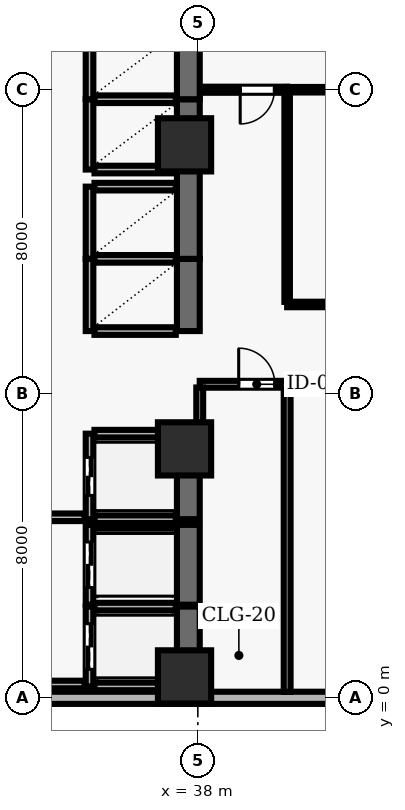
"""IFC4 building model, lengths in metres.
Left out: names, types, materials, properties, quantities, classifications, styles, units other than length and angle.
Written with IfcOpenShell. Run it as: python <this file> out.ifc"""

import sys

from ifc_helpers import new_model, si_unit, direction, frame, frame_2d, origin, origin_2d, place, context, subcontext, project, spatial, rectangle, extrude, element, fill, save


model = new_model("IFC4")
c1 = context("Model", 3, precision=1e-05, world=origin(), true_north=direction((0.0, 1.0)))
c2 = subcontext(c1, "Body", "Model", "MODEL_VIEW")
j1 = project(units=[si_unit("LENGTHUNIT", "METRE"), si_unit("PLANEANGLEUNIT", "RADIAN")], contexts=[c1])
p1 = place(None, origin())
s1 = spatial("IfcSite", under=j1, at=p1, CompositionType="ELEMENT")
p2 = place(p1, origin())
s2 = spatial("IfcBuilding", under=s1, at=p2, CompositionType="ELEMENT")
p3 = place(p2, frame((0.0, 0.0, 42.7)))
s3 = spatial("IfcBuildingStorey", under=s2, at=p3, CompositionType="ELEMENT", Elevation=42.7)
for number, where, z_axis, x_axis in (
    (1, (37.65, 0.55, 0.0), (0.0, 0.0, 1.0), (1.0, 0.0, 0.0)),
    (2, (37.65, 6.55, 0.0), (0.0, 0.0, 1.0), (1.0, 0.0, 0.0)),
    (3, (37.65, 14.55, 0.0), (0.0, 0.0, 1.0), (1.0, 0.0, 0.0)),
):
    element("IfcColumn", number, at=place(p3, frame(where, z_axis=z_axis, x_axis=x_axis)), inside=s3, PredefinedType="COLUMN", context=c2, shape_type="SweptSolid", body=[
        extrude(rectangle(XDim=1.4, YDim=1.4, at=origin_2d()), origin(), (0.0, 0.0, 1.0), 3.9),
    ])
p4 = place(p3, frame((24.5, 0.0, 0.0), z_axis=(0.0, 0.0, 1.0), x_axis=(1.0, 0.0, 0.0)))
e4 = element("IfcWall", 4, at=p4, inside=s3, PredefinedType="SOLIDWALL", context=c2, shape_type="SweptSolid", body=[
    extrude(rectangle(XDim=49.0, YDim=0.32, at=frame_2d((24.5, 0.0))), origin(), (0.0, 0.0, 1.0), 3.69),
])
p5 = place(p4, frame((1.822, 0.0, 0.9)))
e5 = element("IfcOpeningElement", 5, at=p5, cuts=e4, PredefinedType="OPENING", context=c2, shape_type="SweptSolid", body=[
    extrude(rectangle(XDim=1.8, YDim=2.2, at=frame_2d((0.9, 1.1))), frame((0.0, 0.17, 0.0), z_axis=(0.0, -1.0, 0.0), x_axis=(1.0, 0.0, 0.0)), (0.0, 0.0, 1.0), 0.34),
])
p6 = place(p4, frame((18.156, 0.0, 0.9)))
e6 = element("IfcOpeningElement", 6, at=p6, cuts=e4, PredefinedType="OPENING", context=c2, shape_type="SweptSolid", body=[
    extrude(rectangle(XDim=1.8, YDim=2.2, at=frame_2d((0.9, 1.1))), frame((0.0, 0.17, 0.0), z_axis=(0.0, -1.0, 0.0), x_axis=(1.0, 0.0, 0.0)), (0.0, 0.0, 1.0), 0.34),
])
p7 = place(p4, frame((23.6, 0.0, 0.9)))
e7 = element("IfcOpeningElement", 7, at=p7, cuts=e4, PredefinedType="OPENING", context=c2, shape_type="SweptSolid", body=[
    extrude(rectangle(XDim=1.8, YDim=2.2, at=frame_2d((0.9, 1.1))), frame((0.0, 0.17, 0.0), z_axis=(0.0, -1.0, 0.0), x_axis=(1.0, 0.0, 0.0)), (0.0, 0.0, 1.0), 0.34),
])
p8 = place(p4, frame((29.044, 0.0, 0.9)))
e8 = element("IfcOpeningElement", 8, at=p8, cuts=e4, PredefinedType="OPENING", context=c2, shape_type="SweptSolid", body=[
    extrude(rectangle(XDim=1.8, YDim=2.2, at=frame_2d((0.9, 1.1))), frame((0.0, 0.17, 0.0), z_axis=(0.0, -1.0, 0.0), x_axis=(1.0, 0.0, 0.0)), (0.0, 0.0, 1.0), 0.34),
])
p9 = place(p4, frame((34.489, 0.0, 0.9)))
e9 = element("IfcOpeningElement", 9, at=p9, cuts=e4, PredefinedType="OPENING", context=c2, shape_type="SweptSolid", body=[
    extrude(rectangle(XDim=1.8, YDim=2.2, at=frame_2d((0.9, 1.1))), frame((0.0, 0.17, 0.0), z_axis=(0.0, -1.0, 0.0), x_axis=(1.0, 0.0, 0.0)), (0.0, 0.0, 1.0), 0.34),
])
p10 = place(p4, frame((39.933, 0.0, 0.9)))
e10 = element("IfcOpeningElement", 10, at=p10, cuts=e4, PredefinedType="OPENING", context=c2, shape_type="SweptSolid", body=[
    extrude(rectangle(XDim=1.8, YDim=2.2, at=frame_2d((0.9, 1.1))), frame((0.0, 0.17, 0.0), z_axis=(0.0, -1.0, 0.0), x_axis=(1.0, 0.0, 0.0)), (0.0, 0.0, 1.0), 0.34),
])
p11 = place(p4, frame((45.378, 0.0, 0.9)))
e11 = element("IfcOpeningElement", 11, at=p11, cuts=e4, PredefinedType="OPENING", context=c2, shape_type="SweptSolid", body=[
    extrude(rectangle(XDim=1.8, YDim=2.2, at=frame_2d((0.9, 1.1))), frame((0.0, 0.17, 0.0), z_axis=(0.0, -1.0, 0.0), x_axis=(1.0, 0.0, 0.0)), (0.0, 0.0, 1.0), 0.34),
])
p12 = place(p3, frame((35.15, 2.4, 0.0), z_axis=(0.0, 0.0, 1.0), x_axis=(0.0, -1.0, 0.0)))
e12 = element("IfcWall", 12, at=p12, inside=s3, PredefinedType="SOLIDWALL", context=c2, shape_type="SweptSolid", body=[
    extrude(rectangle(XDim=2.1, YDim=0.2, at=frame_2d((1.05, 0.0))), origin(), (0.0, 0.0, 1.0), 3.69),
])
p13 = place(p12, frame((0.45, 0.0, 0.0)))
e13 = element("IfcOpeningElement", 13, at=p13, cuts=e12, PredefinedType="OPENING", context=c2, shape_type="SweptSolid", body=[
    extrude(rectangle(XDim=1.2, YDim=2.15, at=frame_2d((0.6, 1.075))), frame((0.0, 0.11, 0.0), z_axis=(0.0, -1.0, 0.0), x_axis=(1.0, 0.0, 0.0)), (0.0, 0.0, 1.0), 0.22),
])
p14 = place(p3, frame((37.75, 0.3, 0.0), z_axis=(0.0, 0.0, 1.0), x_axis=(0.0, 1.0, 0.0)))
e14 = element("IfcWall", 14, at=p14, inside=s3, PredefinedType="SHEAR", context=c2, shape_type="SweptSolid", body=[
    extrude(rectangle(XDim=2.1, YDim=0.6, at=frame_2d((1.05, 0.0))), origin(), (0.0, 0.0, 1.0), 3.69),
])
for number, where, z_axis, x_axis in (
    (15, (35.28, 0.3, 0.0), (0.0, 0.0, 1.0), (1.0, 0.0, 0.0)),
    (16, (37.42, 2.4, 0.0), (0.0, 0.0, 1.0), (-1.0, 0.0, 0.0)),
):
    element("IfcWall", number, at=place(p3, frame(where, z_axis=z_axis, x_axis=x_axis)), inside=s3, PredefinedType="SOLIDWALL", context=c2, shape_type="SweptSolid", body=[
        extrude(rectangle(XDim=2.14, YDim=0.2, at=frame_2d((1.07, 0.0))), origin(), (0.0, 0.0, 1.0), 3.69),
    ])
p15 = place(p3, frame((35.15, 4.55, 0.0), z_axis=(0.0, 0.0, 1.0), x_axis=(0.0, -1.0, 0.0)))
e17 = element("IfcWall", 17, at=p15, inside=s3, PredefinedType="SOLIDWALL", context=c2, shape_type="SweptSolid", body=[
    extrude(rectangle(XDim=2.1, YDim=0.2, at=frame_2d((1.05, 0.0))), origin(), (0.0, 0.0, 1.0), 3.69),
])
p16 = place(p15, frame((0.45, 0.0, 0.0)))
e18 = element("IfcOpeningElement", 18, at=p16, cuts=e17, PredefinedType="OPENING", context=c2, shape_type="SweptSolid", body=[
    extrude(rectangle(XDim=1.2, YDim=2.15, at=frame_2d((0.6, 1.075))), frame((0.0, 0.11, 0.0), z_axis=(0.0, -1.0, 0.0), x_axis=(1.0, 0.0, 0.0)), (0.0, 0.0, 1.0), 0.22),
])
p17 = place(p3, frame((37.75, 2.45, 0.0), z_axis=(0.0, 0.0, 1.0), x_axis=(0.0, 1.0, 0.0)))
e19 = element("IfcWall", 19, at=p17, inside=s3, PredefinedType="SHEAR", context=c2, shape_type="SweptSolid", body=[
    extrude(rectangle(XDim=2.1, YDim=0.6, at=frame_2d((1.05, 0.0))), origin(), (0.0, 0.0, 1.0), 3.69),
])
p18 = place(p3, frame((37.42, 4.55, 0.0), z_axis=(0.0, 0.0, 1.0), x_axis=(-1.0, 0.0, 0.0)))
e20 = element("IfcWall", 20, at=p18, inside=s3, PredefinedType="SOLIDWALL", context=c2, shape_type="SweptSolid", body=[
    extrude(rectangle(XDim=2.14, YDim=0.2, at=frame_2d((1.07, 0.0))), origin(), (0.0, 0.0, 1.0), 3.69),
])
p19 = place(p3, frame((35.15, 6.95, 0.0), z_axis=(0.0, 0.0, 1.0), x_axis=(0.0, -1.0, 0.0)))
e21 = element("IfcWall", 21, at=p19, inside=s3, PredefinedType="SOLIDWALL", context=c2, shape_type="SweptSolid", body=[
    extrude(rectangle(XDim=2.25, YDim=0.2, at=frame_2d((1.125, 0.0))), origin(), (0.0, 0.0, 1.0), 3.69),
])
p20 = place(p19, frame((0.625, 0.0, 0.0)))
e22 = element("IfcOpeningElement", 22, at=p20, cuts=e21, PredefinedType="OPENING", context=c2, shape_type="SweptSolid", body=[
    extrude(rectangle(XDim=1.0, YDim=2.1, at=frame_2d((0.5, 1.05))), frame((0.0, 0.11, 0.0), z_axis=(0.0, -1.0, 0.0), x_axis=(1.0, 0.0, 0.0)), (0.0, 0.0, 1.0), 0.22),
])
p21 = place(p3, frame((37.75, 4.7, 0.0), z_axis=(0.0, 0.0, 1.0), x_axis=(0.0, 1.0, 0.0)))
e23 = element("IfcWall", 23, at=p21, inside=s3, PredefinedType="SHEAR", context=c2, shape_type="SweptSolid", body=[
    extrude(rectangle(XDim=2.25, YDim=0.6, at=frame_2d((1.125, 0.0))), origin(), (0.0, 0.0, 1.0), 3.69),
])
for number, where, z_axis, x_axis in (
    (24, (35.28, 4.7, 0.0), (0.0, 0.0, 1.0), (1.0, 0.0, 0.0)),
    (25, (37.42, 6.95, 0.0), (0.0, 0.0, 1.0), (-1.0, 0.0, 0.0)),
):
    element("IfcWall", number, at=place(p3, frame(where, z_axis=z_axis, x_axis=x_axis)), inside=s3, PredefinedType="SOLIDWALL", context=c2, shape_type="SweptSolid", body=[
        extrude(rectangle(XDim=2.14, YDim=0.2, at=frame_2d((1.07, 0.0))), origin(), (0.0, 0.0, 1.0), 3.69),
    ])
p22 = place(p3, frame((35.15, 11.55, 0.0), z_axis=(0.0, 0.0, 1.0), x_axis=(0.0, -1.0, 0.0)))
e26 = element("IfcWall", 26, at=p22, inside=s3, PredefinedType="SOLIDWALL", context=c2, shape_type="SweptSolid", body=[
    extrude(rectangle(XDim=1.9, YDim=0.2, at=frame_2d((0.95, 0.0))), origin(), (0.0, 0.0, 1.0), 3.69),
])
p23 = place(p3, frame((37.75, 9.65, 0.0), z_axis=(0.0, 0.0, 1.0), x_axis=(0.0, 1.0, 0.0)))
e27 = element("IfcWall", 27, at=p23, inside=s3, PredefinedType="SHEAR", context=c2, shape_type="SweptSolid", body=[
    extrude(rectangle(XDim=1.9, YDim=0.6, at=frame_2d((0.95, 0.0))), origin(), (0.0, 0.0, 1.0), 3.69),
])
for number, where, z_axis, x_axis in (
    (28, (35.28, 9.65, 0.0), (0.0, 0.0, 1.0), (1.0, 0.0, 0.0)),
    (29, (37.42, 11.55, 0.0), (0.0, 0.0, 1.0), (-1.0, 0.0, 0.0)),
):
    element("IfcWall", number, at=place(p3, frame(where, z_axis=z_axis, x_axis=x_axis)), inside=s3, PredefinedType="SOLIDWALL", context=c2, shape_type="SweptSolid", body=[
        extrude(rectangle(XDim=2.14, YDim=0.2, at=frame_2d((1.07, 0.0))), origin(), (0.0, 0.0, 1.0), 3.69),
    ])
p24 = place(p3, frame((35.15, 13.45, 0.0), z_axis=(0.0, 0.0, 1.0), x_axis=(0.0, -1.0, 0.0)))
e30 = element("IfcWall", 30, at=p24, inside=s3, PredefinedType="SOLIDWALL", context=c2, shape_type="SweptSolid", body=[
    extrude(rectangle(XDim=1.9, YDim=0.2, at=frame_2d((0.95, 0.0))), origin(), (0.0, 0.0, 1.0), 3.69),
])
p25 = place(p3, frame((37.75, 11.55, 0.0), z_axis=(0.0, 0.0, 1.0), x_axis=(0.0, 1.0, 0.0)))
e31 = element("IfcWall", 31, at=p25, inside=s3, PredefinedType="SHEAR", context=c2, shape_type="SweptSolid", body=[
    extrude(rectangle(XDim=2.35, YDim=0.6, at=frame_2d((1.175, 0.0))), origin(), (0.0, 0.0, 1.0), 3.69),
])
p26 = place(p3, frame((37.42, 13.45, 0.0), z_axis=(0.0, 0.0, 1.0), x_axis=(-1.0, 0.0, 0.0)))
e32 = element("IfcWall", 32, at=p26, inside=s3, PredefinedType="SOLIDWALL", context=c2, shape_type="SweptSolid", body=[
    extrude(rectangle(XDim=2.14, YDim=0.2, at=frame_2d((1.07, 0.0))), origin(), (0.0, 0.0, 1.0), 3.69),
])
p27 = place(p3, frame((35.15, 15.75, 0.0), z_axis=(0.0, 0.0, 1.0), x_axis=(0.0, -1.0, 0.0)))
e33 = element("IfcWall", 33, at=p27, inside=s3, PredefinedType="SOLIDWALL", context=c2, shape_type="SweptSolid", body=[
    extrude(rectangle(XDim=1.85, YDim=0.2, at=frame_2d((0.925, 0.0))), origin(), (0.0, 0.0, 1.0), 3.69),
])
p28 = place(p3, frame((37.75, 13.9, 0.0), z_axis=(0.0, 0.0, 1.0), x_axis=(0.0, 1.0, 0.0)))
e34 = element("IfcWall", 34, at=p28, inside=s3, PredefinedType="SHEAR", context=c2, shape_type="SweptSolid", body=[
    extrude(rectangle(XDim=1.85, YDim=0.6, at=frame_2d((0.925, 0.0))), origin(), (0.0, 0.0, 1.0), 3.69),
])
for number, where, z_axis, x_axis in (
    (35, (35.28, 13.9, 0.0), (0.0, 0.0, 1.0), (1.0, 0.0, 0.0)),
    (36, (37.42, 15.75, 0.0), (0.0, 0.0, 1.0), (-1.0, 0.0, 0.0)),
):
    element("IfcWall", number, at=place(p3, frame(where, z_axis=z_axis, x_axis=x_axis)), inside=s3, PredefinedType="SOLIDWALL", context=c2, shape_type="SweptSolid", body=[
        extrude(rectangle(XDim=2.14, YDim=0.2, at=frame_2d((1.07, 0.0))), origin(), (0.0, 0.0, 1.0), 3.69),
    ])
p29 = place(p3, frame((35.15, 17.6, 0.0), z_axis=(0.0, 0.0, 1.0), x_axis=(0.0, -1.0, 0.0)))
e37 = element("IfcWall", 37, at=p29, inside=s3, PredefinedType="SOLIDWALL", context=c2, shape_type="SweptSolid", body=[
    extrude(rectangle(XDim=1.85, YDim=0.2, at=frame_2d((0.925, 0.0))), origin(), (0.0, 0.0, 1.0), 3.69),
])
p30 = place(p3, frame((37.75, 15.75, 0.0), z_axis=(0.0, 0.0, 1.0), x_axis=(0.0, 1.0, 0.0)))
e38 = element("IfcWall", 38, at=p30, inside=s3, PredefinedType="SHEAR", context=c2, shape_type="SweptSolid", body=[
    extrude(rectangle(XDim=1.85, YDim=0.6, at=frame_2d((0.925, 0.0))), origin(), (0.0, 0.0, 1.0), 3.69),
])
p31 = place(p3, frame((31.65, 0.35, 0.0), z_axis=(0.0, 0.0, 1.0), x_axis=(1.0, 0.0, 0.0)))
e39 = element("IfcWall", 39, at=p31, inside=s3, PredefinedType="SOLIDWALL", context=c2, shape_type="SweptSolid", body=[
    extrude(rectangle(XDim=3.37, YDim=0.2, at=frame_2d((1.685, 0.0))), origin(), (0.0, 0.0, 1.0), 3.69),
])
p32 = place(p3, frame((35.02, 4.75, 0.0), z_axis=(0.0, 0.0, 1.0), x_axis=(-1.0, 0.0, 0.0)))
e40 = element("IfcWall", 40, at=p32, inside=s3, PredefinedType="SOLIDWALL", context=c2, shape_type="SweptSolid", body=[
    extrude(rectangle(XDim=3.11, YDim=0.2, at=frame_2d((1.555, 0.0))), origin(), (0.0, 0.0, 1.0), 3.69),
])
p33 = place(p32, frame((1.03, 0.0, 0.0)))
e41 = element("IfcOpeningElement", 41, at=p33, cuts=e40, PredefinedType="OPENING", context=c2, shape_type="SweptSolid", body=[
    extrude(rectangle(XDim=1.05, YDim=2.15, at=frame_2d((0.525, 1.075))), frame((0.0, 0.11, 0.0), z_axis=(0.0, -1.0, 0.0), x_axis=(1.0, 0.0, 0.0)), (0.0, 0.0, 1.0), 0.22),
])
p34 = place(p3, frame((38.05, 8.25, 0.0), z_axis=(0.0, 0.0, 1.0), x_axis=(1.0, 0.0, 0.0)))
e42 = element("IfcWall", 42, at=p34, inside=s3, PredefinedType="PARTITIONING", context=c2, shape_type="SweptSolid", body=[
    extrude(rectangle(XDim=2.3, YDim=0.18, at=frame_2d((1.15, 0.0))), origin(), (0.0, 0.0, 1.0), 3.055),
])
p35 = place(p34, frame((1.025, 0.0, 0.0)))
e43 = element("IfcOpeningElement", 43, at=p35, cuts=e42, PredefinedType="OPENING", context=c2, shape_type="SweptSolid", body=[
    extrude(rectangle(XDim=0.95, YDim=2.1, at=frame_2d((0.475, 1.05))), frame((0.0, 0.1, 0.0), z_axis=(0.0, -1.0, 0.0), x_axis=(1.0, 0.0, 0.0)), (0.0, 0.0, 1.0), 0.2),
])
p36 = place(p3, frame((40.35, 8.25, 0.0), z_axis=(0.0, 0.0, 1.0), x_axis=(1.0, 0.0, 0.0)))
e44 = element("IfcWall", 44, at=p36, inside=s3, PredefinedType="PARTITIONING", context=c2, shape_type="SweptSolid", body=[
    extrude(rectangle(XDim=17.45, YDim=0.145, at=frame_2d((8.725, 0.0))), origin(), (0.0, 0.0, 1.0), 3.055),
])
p37 = place(p36, frame((8.175, 0.0, 0.0)))
e45 = element("IfcOpeningElement", 45, at=p37, cuts=e44, PredefinedType="OPENING", context=c2, shape_type="SweptSolid", body=[
    extrude(rectangle(XDim=1.1, YDim=2.15, at=frame_2d((0.55, 1.075))), frame((0.0, 0.083, 0.0), z_axis=(0.0, -1.0, 0.0), x_axis=(1.0, 0.0, 0.0)), (0.0, 0.0, 1.0), 0.165),
])
p38 = place(p3, frame((40.35, 16.0, 0.0), z_axis=(0.0, 0.0, 1.0), x_axis=(1.0, 0.0, 0.0)))
e46 = element("IfcWall", 46, at=p38, inside=s3, PredefinedType="PARTITIONING", context=c2, shape_type="SweptSolid", body=[
    extrude(rectangle(XDim=13.545, YDim=0.145, at=frame_2d((6.772, 0.0))), origin(), (0.0, 0.0, 1.0), 3.39),
])
p39 = place(p3, frame((40.35, 16.0, 0.0), z_axis=(0.0, 0.0, 1.0), x_axis=(-1.0, 0.0, 0.0)))
e47 = element("IfcWall", 47, at=p39, inside=s3, PredefinedType="PARTITIONING", context=c2, shape_type="SweptSolid", body=[
    extrude(rectangle(XDim=2.27, YDim=0.16, at=frame_2d((1.135, 0.0))), origin(), (0.0, 0.0, 1.0), 3.69),
])
p40 = place(p39, frame((0.335, 0.0, 0.0)))
e48 = element("IfcOpeningElement", 48, at=p40, cuts=e47, PredefinedType="OPENING", context=c2, shape_type="SweptSolid", body=[
    extrude(rectangle(XDim=0.9, YDim=2.1, at=frame_2d((0.45, 1.05))), frame((0.0, 0.09, 0.0), z_axis=(0.0, -1.0, 0.0), x_axis=(1.0, 0.0, 0.0)), (0.0, 0.0, 1.0), 0.18),
])
p41 = place(p3, frame((57.8, 10.35, 0.0), z_axis=(0.0, 0.0, 1.0), x_axis=(-1.0, 0.0, 0.0)))
e49 = element("IfcWall", 49, at=p41, inside=s3, PredefinedType="PARTITIONING", context=c2, shape_type="SweptSolid", body=[
    extrude(rectangle(XDim=17.45, YDim=0.145, at=frame_2d((8.725, 0.0))), origin(), (0.0, 0.0, 1.0), 3.277),
])
p42 = place(p41, frame((8.175, 0.0, 0.0)))
e50 = element("IfcOpeningElement", 50, at=p42, cuts=e49, PredefinedType="OPENING", context=c2, shape_type="SweptSolid", body=[
    extrude(rectangle(XDim=1.1, YDim=2.15, at=frame_2d((0.55, 1.075))), frame((0.0, 0.083, 0.0), z_axis=(0.0, -1.0, 0.0), x_axis=(1.0, 0.0, 0.0)), (0.0, 0.0, 1.0), 0.165),
])
p43 = place(p3, frame((38.05, 7.05, 0.0), z_axis=(0.0, 0.0, 1.0), x_axis=(0.0, 1.0, 0.0)))
e51 = element("IfcWall", 51, at=p43, inside=s3, PredefinedType="PARTITIONING", context=c2, shape_type="SweptSolid", body=[
    extrude(rectangle(XDim=1.115, YDim=0.18, at=frame_2d((0.558, 0.0))), origin(), (0.0, 0.0, 1.0), 3.055),
])
p44 = place(p3, frame((40.35, 0.155, 0.0), z_axis=(0.0, 0.0, 1.0), x_axis=(0.0, 1.0, 0.0)))
e52 = element("IfcWall", 52, at=p44, inside=s3, PredefinedType="PARTITIONING", context=c2, shape_type="SweptSolid", body=[
    extrude(rectangle(XDim=8.01, YDim=0.18, at=frame_2d((4.005, 0.0))), origin(), (0.0, 0.0, 1.0), 3.69),
])
p45 = place(p3, frame((40.35, 10.418, 0.0), z_axis=(0.0, 0.0, 1.0), x_axis=(0.0, 1.0, 0.0)))
e53 = element("IfcWall", 53, at=p45, inside=s3, PredefinedType="PARTITIONING", context=c2, shape_type="SweptSolid", body=[
    extrude(rectangle(XDim=5.507, YDim=0.145, at=frame_2d((2.753, 0.0))), origin(), (0.0, 0.0, 1.0), 3.277),
])
p46 = place(p13, origin())
e54 = element("IfcDoor", 54, at=p46, inside=s3, OperationType="DOUBLE_DOOR_SLIDING", PredefinedType="DOOR", context=c2, shape_type="SweptSolid", body=[
    extrude(rectangle(XDim=1.2, YDim=2.15, at=frame_2d((0.6, 1.075))), frame((0.0, 0.025, 0.0), z_axis=(0.0, -1.0, 0.0), x_axis=(1.0, 0.0, 0.0)), (0.0, 0.0, 1.0), 0.05),
])
fill(e13, e54)
p47 = place(p16, origin())
e55 = element("IfcDoor", 55, at=p47, inside=s3, OperationType="DOUBLE_DOOR_SLIDING", PredefinedType="DOOR", context=c2, shape_type="SweptSolid", body=[
    extrude(rectangle(XDim=1.2, YDim=2.15, at=frame_2d((0.6, 1.075))), frame((0.0, 0.025, 0.0), z_axis=(0.0, -1.0, 0.0), x_axis=(1.0, 0.0, 0.0)), (0.0, 0.0, 1.0), 0.05),
])
fill(e18, e55)
p48 = place(p20, origin())
e56 = element("IfcDoor", 56, at=p48, inside=s3, OperationType="DOUBLE_DOOR_SLIDING", PredefinedType="DOOR", context=c2, shape_type="SweptSolid", body=[
    extrude(rectangle(XDim=1.0, YDim=2.1, at=frame_2d((0.5, 1.05))), frame((0.0, 0.025, 0.0), z_axis=(0.0, -1.0, 0.0), x_axis=(1.0, 0.0, 0.0)), (0.0, 0.0, 1.0), 0.05),
])
fill(e22, e56)
p49 = place(p35, origin())
e57 = element("IfcDoor", 57, at=p49, inside=s3, OperationType="SINGLE_SWING_LEFT", PredefinedType="DOOR", context=c2, shape_type="SweptSolid", body=[
    extrude(rectangle(XDim=0.95, YDim=2.1, at=frame_2d((0.475, 1.05))), frame((0.0, 0.025, 0.0), z_axis=(0.0, -1.0, 0.0), x_axis=(1.0, 0.0, 0.0)), (0.0, 0.0, 1.0), 0.05),
])
fill(e43, e57)
p50 = place(p40, origin())
e58 = element("IfcDoor", 58, at=p50, inside=s3, OperationType="SINGLE_SWING_RIGHT", PredefinedType="DOOR", context=c2, shape_type="SweptSolid", body=[
    extrude(rectangle(XDim=0.9, YDim=2.1, at=frame_2d((0.45, 1.05))), frame((0.0, 0.025, 0.0), z_axis=(0.0, -1.0, 0.0), x_axis=(1.0, 0.0, 0.0)), (0.0, 0.0, 1.0), 0.05),
])
fill(e48, e58)
save(model, sys.argv[1])
